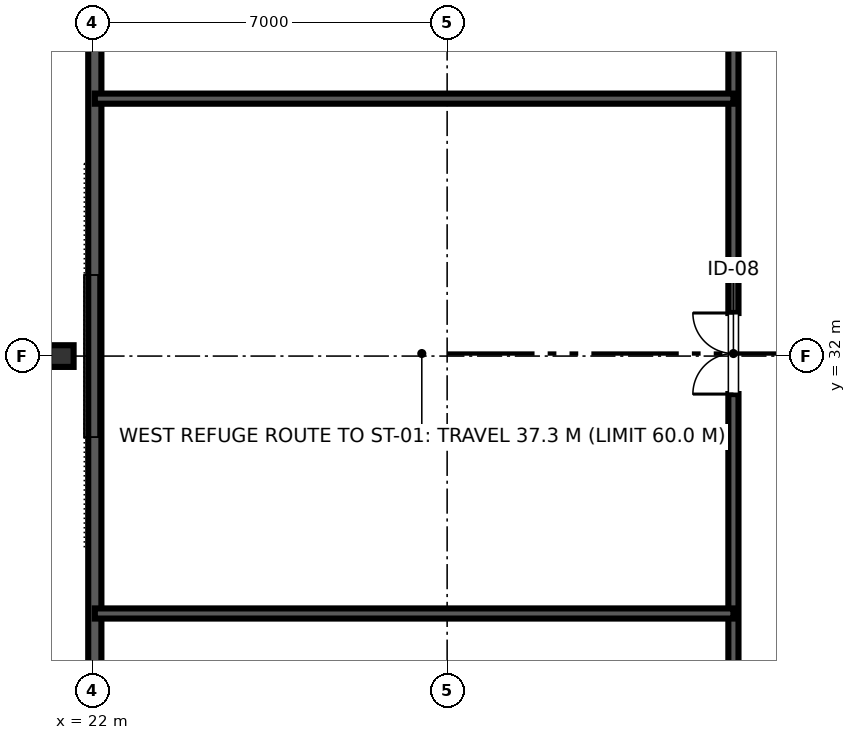
"""IFC4 building model, lengths in metres.
Left out: names, types, materials, properties, quantities, classifications, styles, units other than length and angle.
Written with IfcOpenShell. Run it as: python <this file> out.ifc"""

import sys

from ifc_helpers import new_model, si_unit, direction, frame, frame_2d, origin, origin_2d, place, context, subcontext, project, spatial, rectangle, i_section, extrude, element, fill, save


model = new_model("IFC4")
c1 = context("Model", 3, precision=1e-05, world=origin(), true_north=direction((0.0, 1.0)))
c2 = subcontext(c1, "Body", "Model", "MODEL_VIEW")
j1 = project(units=[si_unit("LENGTHUNIT", "METRE"), si_unit("PLANEANGLEUNIT", "RADIAN")], contexts=[c1])
p1 = place(None, origin())
s1 = spatial("IfcSite", under=j1, at=p1, CompositionType="ELEMENT")
p2 = place(p1, origin())
s2 = spatial("IfcBuilding", under=s1, at=p2, CompositionType="ELEMENT")
p3 = place(p2, frame((0.0, 0.0, 85.6)))
s3 = spatial("IfcBuildingStorey", under=s2, at=p3, CompositionType="ELEMENT", Elevation=85.6)
p4 = place(p3, frame((21.387, 32.0, 0.0), z_axis=(0.048305138147, 0.0, 0.998832625433), x_axis=(-0.998832625433, 0.0, 0.048305138147)))
e1 = element("IfcColumn", 1, at=p4, inside=s3, PredefinedType="COLUMN", context=c2, shape_type="SweptSolid", body=[
    extrude(i_section(OverallWidth=0.428, OverallDepth=0.483, WebThickness=0.051, FlangeThickness=0.082, FilletRadius=0.025, at=origin_2d()), origin(), (0.0, 0.0, 1.0), 4.483),
])
p5 = place(p3, frame((22.047, 49.107, 0.0), z_axis=(0.0, 0.0, 1.0), x_axis=(0.0, -1.0, 0.0)))
e2 = element("IfcWall", 2, at=p5, inside=s3, PredefinedType="STANDARD", context=c2, shape_type="SweptSolid", body=[
    extrude(rectangle(XDim=34.213, YDim=0.26, at=frame_2d((17.107, 0.0))), origin(), (0.0, 0.0, 1.0), 4.48),
])
p6 = place(p3, frame((34.65, 21.65, 0.0), z_axis=(0.0, 0.0, 1.0), x_axis=(0.0, 1.0, 0.0)))
e3 = element("IfcWall", 3, at=p6, inside=s3, PredefinedType="PARTITIONING", context=c2, shape_type="SweptSolid", body=[
    extrude(rectangle(XDim=20.7, YDim=0.2, at=frame_2d((10.35, 0.0))), origin(), (0.0, 0.0, 1.0), 3.41),
])
p7 = place(p6, frame((9.6, 0.0, 0.0)))
e4 = element("IfcOpeningElement", 4, at=p7, cuts=e3, PredefinedType="OPENING", context=c2, shape_type="SweptSolid", body=[
    extrude(rectangle(XDim=1.6, YDim=2.15, at=frame_2d((0.8, 1.075))), frame((0.0, 0.11, 0.0), z_axis=(0.0, -1.0, 0.0), x_axis=(1.0, 0.0, 0.0)), (0.0, 0.0, 1.0), 0.22),
])
for number, where, z_axis, x_axis in (
    (5, (22.047, 26.92, 0.0), (0.0, 0.0, 1.0), (1.0, 0.0, 0.0)),
    (6, (22.047, 37.08, 0.0), (0.0, 0.0, 1.0), (1.0, 0.0, 0.0)),
):
    element("IfcWall", number, at=place(p3, frame(where, z_axis=z_axis, x_axis=x_axis)), inside=s3, PredefinedType="PARTITIONING", context=c2, shape_type="SweptSolid", body=[
        extrude(rectangle(XDim=12.603, YDim=0.2, at=frame_2d((6.302, 0.0))), origin(), (0.0, 0.0, 1.0), 3.41),
    ])
p8 = place(p7, origin())
e7 = element("IfcDoor", 7, at=p8, inside=s3, OperationType="DOUBLE_DOOR_SINGLE_SWING", PredefinedType="DOOR", context=c2, shape_type="SweptSolid", body=[
    extrude(rectangle(XDim=1.6, YDim=2.15, at=frame_2d((0.8, 1.075))), frame((0.0, 0.025, 0.0), z_axis=(0.0, -1.0, 0.0), x_axis=(1.0, 0.0, 0.0)), (0.0, 0.0, 1.0), 0.05),
])
fill(e4, e7)
save(model, sys.argv[1])
